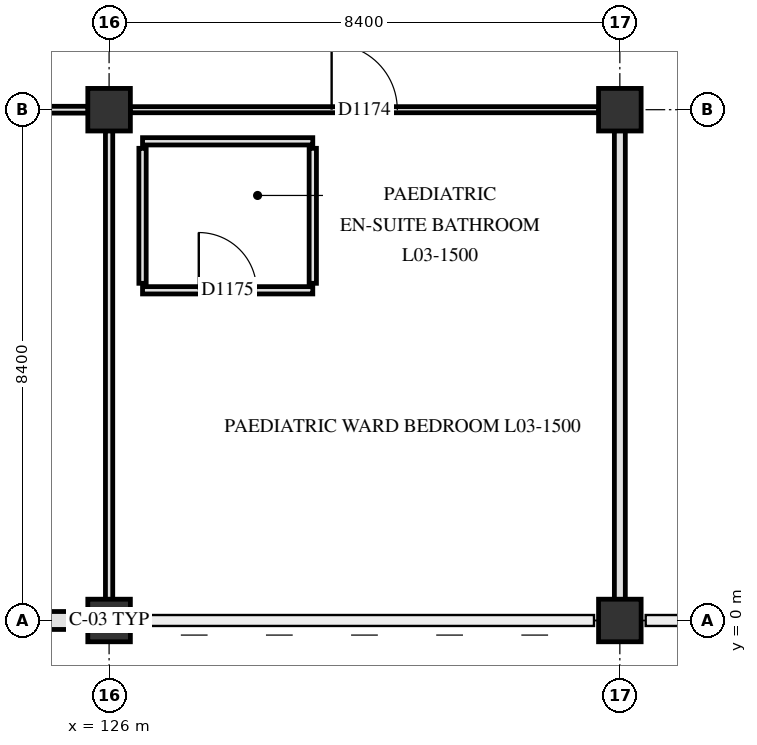
"""IFC4 building model, lengths in metres.
Left out: names, types, materials, properties, quantities, classifications, styles, units other than length and angle.
Written with IfcOpenShell. Run it as: python <this file> out.ifc"""

import sys

from ifc_helpers import new_model, si_unit, direction, frame, frame_2d, origin, origin_2d, place, context, subcontext, project, spatial, rectangle, extrude, element, fill, save


model = new_model("IFC4")
c1 = context("Model", 3, precision=1e-05, world=origin(), true_north=direction((0.0, 1.0)))
c2 = subcontext(c1, "Body", "Model", "MODEL_VIEW")
j1 = project(units=[si_unit("LENGTHUNIT", "METRE"), si_unit("PLANEANGLEUNIT", "RADIAN")], contexts=[c1])
p1 = place(None, origin())
s1 = spatial("IfcSite", under=j1, at=p1, CompositionType="ELEMENT")
p2 = place(p1, origin())
s2 = spatial("IfcBuilding", under=s1, at=p2, CompositionType="ELEMENT")
p3 = place(p2, frame((0.0, 0.0, 14.4)))
s3 = spatial("IfcBuildingStorey", under=s2, at=p3, CompositionType="ELEMENT", Elevation=14.4)
for number, where, z_axis, x_axis in (
    (1, (126.0, 0.0, 0.0), (0.0, 0.0, 1.0), (1.0, 0.0, 0.0)),
    (2, (126.0, 8.4, 0.0), (0.0, 0.0, 1.0), (1.0, 0.0, 0.0)),
    (3, (134.4, 0.0, 0.0), (0.0, 0.0, 1.0), (1.0, 0.0, 0.0)),
    (4, (134.4, 8.4, 0.0), (0.0, 0.0, 1.0), (1.0, 0.0, 0.0)),
):
    element("IfcColumn", number, at=place(p3, frame(where, z_axis=z_axis, x_axis=x_axis)), inside=s3, PredefinedType="COLUMN", context=c2, shape_type="SweptSolid", body=[
        extrude(rectangle(XDim=0.7, YDim=0.7, at=origin_2d()), origin(), (0.0, 0.0, 1.0), 4.2),
    ])
p4 = place(p3, frame((125.575, 0.0, 0.0), z_axis=(0.0, 0.0, 1.0), x_axis=(-1.0, 0.0, 0.0)))
e5 = element("IfcWall", 5, at=p4, inside=s3, PredefinedType="SOLIDWALL", context=c2, shape_type="SweptSolid", body=[
    extrude(rectangle(XDim=7.55, YDim=0.295, at=frame_2d((3.775, 0.0))), origin(), (0.0, 0.0, 1.0), 2.89),
])
p5 = place(p4, frame((1.238, 0.0, 0.85)))
e6 = element("IfcOpeningElement", 6, at=p5, cuts=e5, PredefinedType="OPENING", context=c2, shape_type="SweptSolid", body=[
    extrude(rectangle(XDim=1.3, YDim=1.42, at=frame_2d((0.65, 0.71))), frame((0.0, 0.157, 0.0), z_axis=(0.0, -1.0, 0.0), x_axis=(1.0, 0.0, 0.0)), (0.0, 0.0, 1.0), 0.315),
])
p6 = place(p4, frame((4.962, 0.0, 0.85)))
e7 = element("IfcOpeningElement", 7, at=p6, cuts=e5, PredefinedType="OPENING", context=c2, shape_type="SweptSolid", body=[
    extrude(rectangle(XDim=1.4, YDim=1.42, at=frame_2d((0.7, 0.71))), frame((0.0, 0.157, 0.0), z_axis=(0.0, -1.0, 0.0), x_axis=(1.0, 0.0, 0.0)), (0.0, 0.0, 1.0), 0.315),
])
p7 = place(p3, frame((126.55, 5.43, 0.0), z_axis=(0.0, 0.0, 1.0), x_axis=(1.0, 0.0, 0.0)))
e8 = element("IfcWall", 8, at=p7, inside=s3, PredefinedType="PARTITIONING", context=c2, shape_type="SweptSolid", body=[
    extrude(rectangle(XDim=2.8, YDim=0.12, at=frame_2d((1.4, 0.0))), origin(), (0.0, 0.0, 1.0), 3.89),
])
p8 = place(p7, frame((0.925, 0.0, 0.0)))
e9 = element("IfcOpeningElement", 9, at=p8, cuts=e8, PredefinedType="OPENING", context=c2, shape_type="SweptSolid", body=[
    extrude(rectangle(XDim=0.95, YDim=2.1, at=frame_2d((0.475, 1.05))), frame((0.0, 0.07, 0.0), z_axis=(0.0, -1.0, 0.0), x_axis=(1.0, 0.0, 0.0)), (0.0, 0.0, 1.0), 0.14),
])
p9 = place(p3, frame((126.55, 7.88, 0.0), z_axis=(0.0, 0.0, 1.0), x_axis=(1.0, 0.0, 0.0)))
e10 = element("IfcWall", 10, at=p9, inside=s3, PredefinedType="PARTITIONING", context=c2, shape_type="SweptSolid", body=[
    extrude(rectangle(XDim=2.8, YDim=0.12, at=frame_2d((1.4, 0.0))), origin(), (0.0, 0.0, 1.0), 3.89),
])
p10 = place(p3, frame((117.945, 8.4, 0.0), z_axis=(0.0, 0.0, 1.0), x_axis=(1.0, 0.0, 0.0)))
e11 = element("IfcWall", 11, at=p10, inside=s3, PredefinedType="PARTITIONING", context=c2, shape_type="SweptSolid", body=[
    extrude(rectangle(XDim=7.71, YDim=0.112, at=frame_2d((3.855, 0.0))), origin(), (0.0, 0.0, 1.0), 3.29),
])
p11 = place(p10, frame((4.125, 0.0, 0.0)))
e12 = element("IfcOpeningElement", 12, at=p11, cuts=e11, PredefinedType="OPENING", context=c2, shape_type="SweptSolid", body=[
    extrude(rectangle(XDim=1.7, YDim=2.25, at=frame_2d((0.85, 1.125))), frame((0.0, 0.066, 0.0), z_axis=(0.0, -1.0, 0.0), x_axis=(1.0, 0.0, 0.0)), (0.0, 0.0, 1.0), 0.132),
])
p12 = place(p3, frame((126.345, 8.4, 0.0), z_axis=(0.0, 0.0, 1.0), x_axis=(1.0, 0.0, 0.0)))
e13 = element("IfcWall", 13, at=p12, inside=s3, PredefinedType="PARTITIONING", context=c2, shape_type="SweptSolid", body=[
    extrude(rectangle(XDim=7.71, YDim=0.1, at=frame_2d((3.855, 0.0))), origin(), (0.0, 0.0, 1.0), 3.29),
])
p13 = place(p12, frame((3.315, 0.0, 0.0)))
e14 = element("IfcOpeningElement", 14, at=p13, cuts=e13, PredefinedType="OPENING", context=c2, shape_type="SweptSolid", body=[
    extrude(rectangle(XDim=1.08, YDim=2.12, at=frame_2d((0.54, 1.06))), frame((0.0, 0.06, 0.0), z_axis=(0.0, -1.0, 0.0), x_axis=(1.0, 0.0, 0.0)), (0.0, 0.0, 1.0), 0.12),
])
p14 = place(p3, frame((126.0, 0.345, 0.0), z_axis=(0.0, 0.0, 1.0), x_axis=(0.0, 1.0, 0.0)))
e15 = element("IfcWall", 15, at=p14, inside=s3, PredefinedType="PARTITIONING", context=c2, shape_type="SweptSolid", body=[
    extrude(rectangle(XDim=7.71, YDim=0.12, at=frame_2d((3.855, 0.0))), origin(), (0.0, 0.0, 1.0), 2.69),
])
for number, where, z_axis, x_axis in (
    (16, (126.55, 5.545, 0.0), (0.0, 0.0, 1.0), (0.0, 1.0, 0.0)),
    (17, (129.35, 5.545, 0.0), (0.0, 0.0, 1.0), (0.0, 1.0, 0.0)),
):
    element("IfcWall", number, at=place(p3, frame(where, z_axis=z_axis, x_axis=x_axis)), inside=s3, PredefinedType="PARTITIONING", context=c2, shape_type="SweptSolid", body=[
        extrude(rectangle(XDim=2.22, YDim=0.12, at=frame_2d((1.11, 0.0))), origin(), (0.0, 0.0, 1.0), 3.89),
    ])
p15 = place(p3, frame((134.4, 0.345, 0.0), z_axis=(0.0, 0.0, 1.0), x_axis=(0.0, 1.0, 0.0)))
e18 = element("IfcWall", 18, at=p15, inside=s3, PredefinedType="PARTITIONING", context=c2, shape_type="SweptSolid", body=[
    extrude(rectangle(XDim=7.71, YDim=0.18, at=frame_2d((3.855, 0.0))), origin(), (0.0, 0.0, 1.0), 3.34),
])
p16 = place(p13, origin())
e19 = element("IfcDoor", 19, at=p16, inside=s3, OperationType="SINGLE_SWING_LEFT", PredefinedType="DOOR", context=c2, shape_type="SweptSolid", body=[
    extrude(rectangle(XDim=1.08, YDim=2.12, at=frame_2d((0.54, 1.06))), frame((0.0, 0.025, 0.0), z_axis=(0.0, -1.0, 0.0), x_axis=(1.0, 0.0, 0.0)), (0.0, 0.0, 1.0), 0.05),
])
fill(e14, e19)
p17 = place(p8, origin())
e20 = element("IfcDoor", 20, at=p17, inside=s3, OperationType="SINGLE_SWING_LEFT", PredefinedType="DOOR", context=c2, shape_type="SweptSolid", body=[
    extrude(rectangle(XDim=0.95, YDim=2.1, at=frame_2d((0.475, 1.05))), frame((0.0, 0.025, 0.0), z_axis=(0.0, -1.0, 0.0), x_axis=(1.0, 0.0, 0.0)), (0.0, 0.0, 1.0), 0.05),
])
fill(e9, e20)
save(model, sys.argv[1])
